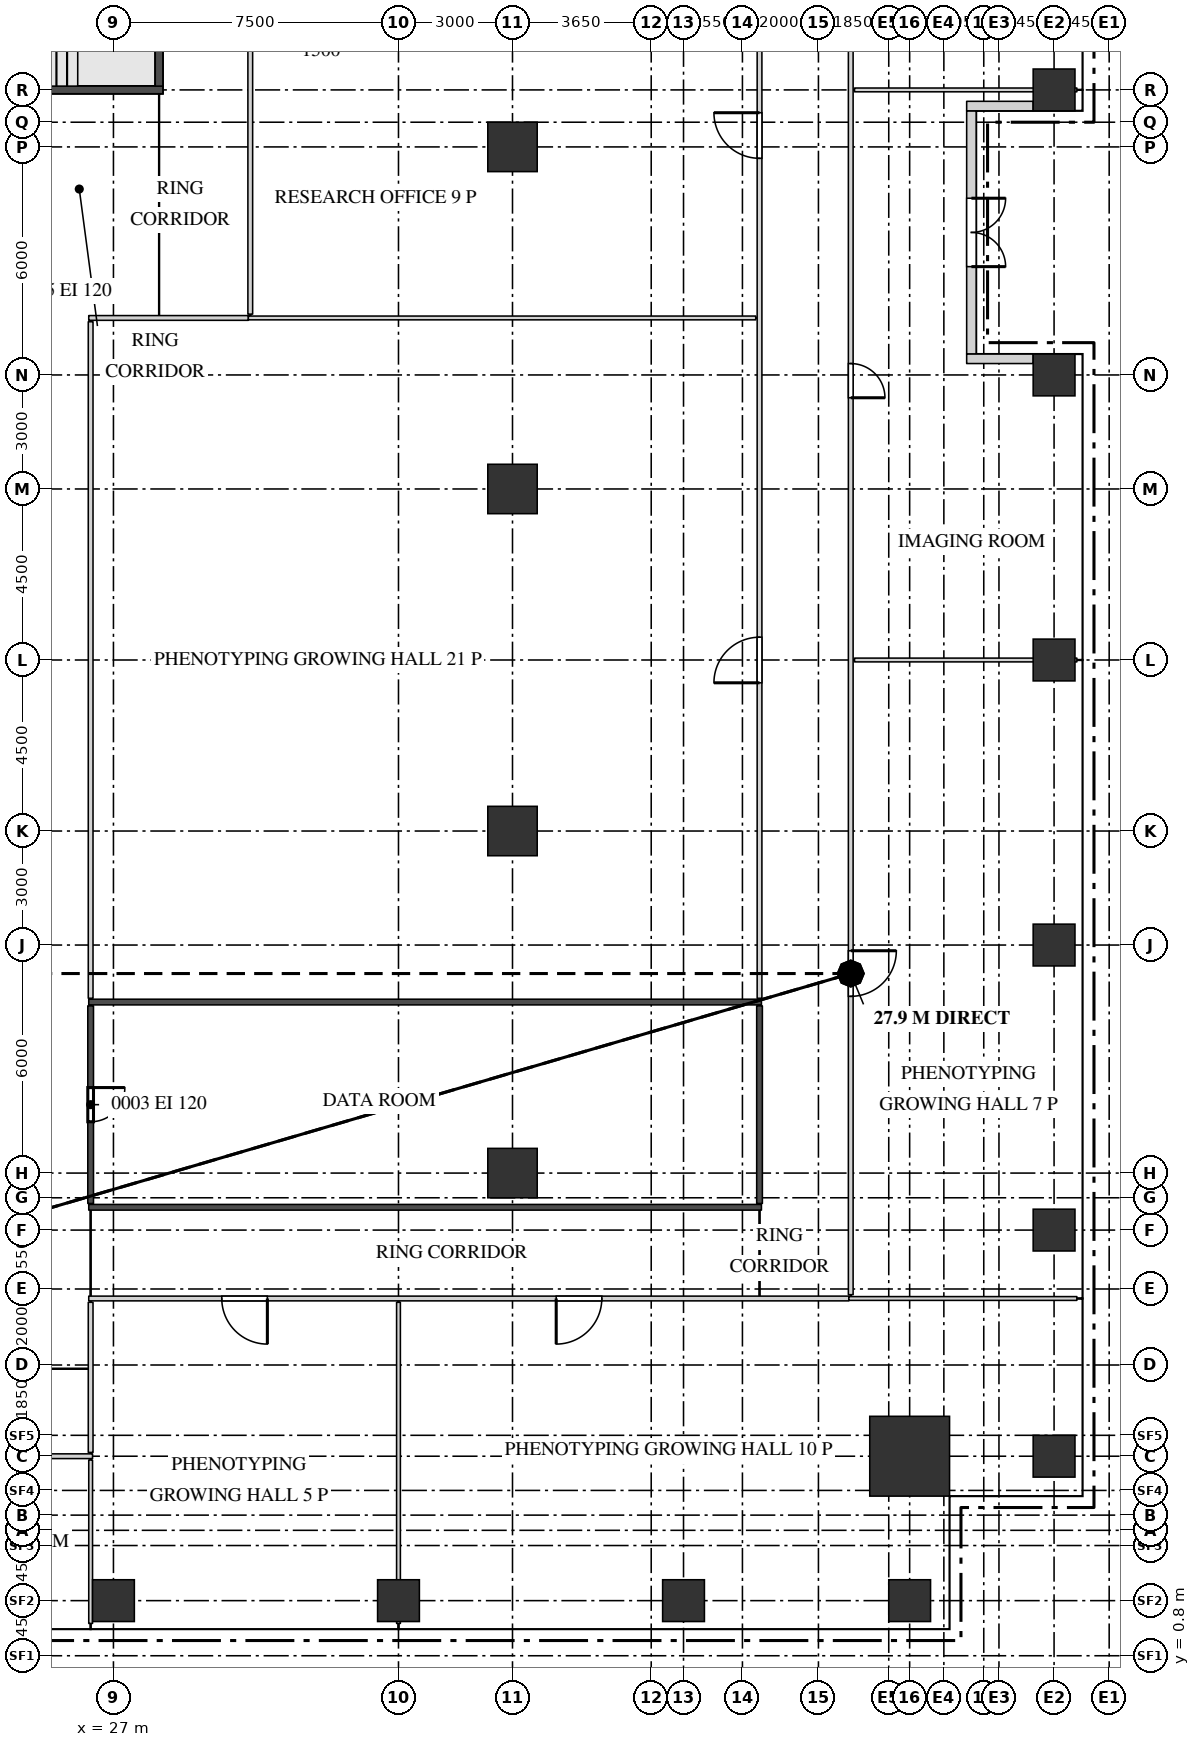
"""IFC4 building model, lengths in metres.
Left out: names, types, materials, properties, quantities, classifications, styles, units other than length and angle.
Written with IfcOpenShell. Run it as: python <this file> out.ifc"""

import sys

from ifc_helpers import new_model, si_unit, direction, frame, frame_2d, origin, origin_2d, place, context, subcontext, project, spatial, rectangle, extrude, source, transform, mapped, element, fill, save


model = new_model("IFC4")
c1 = context("Model", 3, precision=1e-05, world=origin(), true_north=direction((0.0, 1.0)))
c2 = subcontext(c1, "Body", "Model", "MODEL_VIEW")
j1 = project(units=[si_unit("LENGTHUNIT", "METRE"), si_unit("PLANEANGLEUNIT", "RADIAN")], contexts=[c1])
p1 = place(None, origin())
s1 = spatial("IfcSite", under=j1, at=p1, CompositionType="ELEMENT")
p2 = place(p1, origin())
s2 = spatial("IfcBuilding", under=s1, at=p2, CompositionType="ELEMENT")
p3 = place(p2, frame((0.0, 0.0, 127.9)))
s3 = spatial("IfcBuildingStorey", under=s2, at=p3, CompositionType="ELEMENT", Elevation=127.9)
m1 = source(origin(), c2, "Body", "SweptSolid", [
    extrude(rectangle(XDim=7.1, YDim=0.2, at=frame_2d((3.55, 0.0))), origin(), (0.0, 0.0, 1.0), 4.1),
])
p4 = place(p3, frame((21.2, 42.0, 0.0), z_axis=(0.0, 0.0, 1.0), x_axis=(1.0, 0.0, 0.0)))
e1 = element("IfcWall", 1, at=p4, inside=s3, PredefinedType="SHEAR", context=c2, shape_type="MappedRepresentation", body=[
    mapped(m1, transform((0.0, 0.0, 0.0))),
])
m2 = source(origin(), c2, "Body", "SweptSolid", [
    extrude(rectangle(XDim=3.35, YDim=0.2, at=frame_2d((1.675, 0.0))), origin(), (0.0, 0.0, 1.0), 4.1),
])
p5 = place(p3, frame((28.2, 42.1, 0.0), z_axis=(0.0, 0.0, 1.0), x_axis=(0.0, 1.0, 0.0)))
e2 = element("IfcWall", 2, at=p5, inside=s3, PredefinedType="SHEAR", context=c2, shape_type="MappedRepresentation", body=[
    mapped(m2, transform((0.0, 0.0, 0.0))),
])
m3 = source(origin(), c2, "Body", "SweptSolid", [
    extrude(rectangle(XDim=2.1, YDim=2.1, at=origin_2d()), origin(), (0.0, 0.0, 1.0), 4.4),
])
p6 = place(p3, frame((47.95, 6.05, 0.0), z_axis=(0.0, 0.0, 1.0), x_axis=(1.0, 0.0, 0.0)))
e3 = element("IfcColumn", 3, at=p6, inside=s3, PredefinedType="COLUMN", context=c2, shape_type="MappedRepresentation", body=[
    mapped(m3, transform((0.0, 0.0, 0.0))),
])
m4 = source(origin(), c2, "Body", "SweptSolid", [
    extrude(rectangle(XDim=1.1, YDim=1.1, at=origin_2d()), origin(), (0.0, 0.0, 1.0), 4.1),
])
for number, where, z_axis, x_axis in (
    (4, (27.0, 2.25, 0.0), (0.0, 0.0, 1.0), (1.0, 0.0, 0.0)),
    (5, (34.5, 2.25, 0.0), (0.0, 0.0, 1.0), (1.0, 0.0, 0.0)),
    (6, (42.0, 2.25, 0.0), (0.0, 0.0, 1.0), (1.0, 0.0, 0.0)),
    (7, (47.95, 2.25, 0.0), (0.0, 0.0, 1.0), (1.0, 0.0, 0.0)),
    (8, (51.75, 6.05, 0.0), (0.0, 0.0, 1.0), (1.0, 0.0, 0.0)),
    (9, (51.75, 12.0, 0.0), (0.0, 0.0, 1.0), (1.0, 0.0, 0.0)),
    (10, (51.75, 19.5, 0.0), (0.0, 0.0, 1.0), (1.0, 0.0, 0.0)),
    (11, (51.75, 27.0, 0.0), (0.0, 0.0, 1.0), (1.0, 0.0, 0.0)),
    (12, (51.75, 34.5, 0.0), (0.0, 0.0, 1.0), (1.0, 0.0, 0.0)),
    (13, (51.75, 42.0, 0.0), (0.0, 0.0, 1.0), (1.0, 0.0, 0.0)),
):
    element("IfcColumn", number, at=place(p3, frame(where, z_axis=z_axis, x_axis=x_axis)), inside=s3, PredefinedType="COLUMN", context=c2, shape_type="MappedRepresentation", body=[
        mapped(m4, transform((0.0, 0.0, 0.0))),
    ])
m5 = source(origin(), c2, "Body", "SweptSolid", [
    extrude(rectangle(XDim=1.3, YDim=1.3, at=origin_2d()), origin(), (0.0, 0.0, 1.0), 4.1),
])
for number, where, z_axis, x_axis in (
    (14, (37.5, 13.5, 0.0), (0.0, 0.0, 1.0), (1.0, 0.0, 0.0)),
    (15, (37.5, 22.5, 0.0), (0.0, 0.0, 1.0), (1.0, 0.0, 0.0)),
    (16, (37.5, 31.5, 0.0), (0.0, 0.0, 1.0), (1.0, 0.0, 0.0)),
    (17, (37.5, 40.5, 0.0), (0.0, 0.0, 1.0), (1.0, 0.0, 0.0)),
):
    element("IfcColumn", number, at=place(p3, frame(where, z_axis=z_axis, x_axis=x_axis)), inside=s3, PredefinedType="COLUMN", context=c2, shape_type="MappedRepresentation", body=[
        mapped(m5, transform((0.0, 0.0, 0.0))),
    ])
m6 = source(origin(), c2, "Body", "SweptSolid", [
    extrude(rectangle(XDim=6.4, YDim=0.25, at=frame_2d((3.2, 0.0))), origin(), (0.0, 0.0, 1.0), 3.55),
])
p7 = place(p3, frame((49.575, 35.05, 0.0), z_axis=(0.0, 0.0, 1.0), x_axis=(0.0, 1.0, 0.0)))
e18 = element("IfcWall", 18, at=p7, inside=s3, PredefinedType="SOLIDWALL", context=c2, shape_type="MappedRepresentation", body=[
    mapped(m6, transform((0.0, 0.0, 0.0))),
])
m7 = source(origin(), c2, "Body", "SweptSolid", [
    extrude(rectangle(XDim=1.65, YDim=2.4, at=frame_2d((0.825, 1.2))), frame((0.0, 0.135, 0.0), z_axis=(0.0, -1.0, 0.0), x_axis=(1.0, 0.0, 0.0)), (0.0, 0.0, 1.0), 0.27),
])
p8 = place(p7, frame((0.35, 0.0, 0.0)))
e19 = element("IfcOpeningElement", 19, at=p8, cuts=e18, PredefinedType="OPENING", context=c2, shape_type="MappedRepresentation", body=[
    mapped(m7, transform((0.0, 0.0, 0.0))),
])
p9 = place(p7, frame((4.4, 0.0, 0.0)))
e20 = element("IfcOpeningElement", 20, at=p9, cuts=e18, PredefinedType="OPENING", context=c2, shape_type="MappedRepresentation", body=[
    mapped(m7, transform((0.0, 0.0, 0.0))),
])
m8 = source(origin(), c2, "Body", "SweptSolid", [
    extrude(rectangle(XDim=1.8, YDim=2.4, at=frame_2d((0.9, 1.2))), frame((0.0, 0.135, 0.0), z_axis=(0.0, -1.0, 0.0), x_axis=(1.0, 0.0, 0.0)), (0.0, 0.0, 1.0), 0.27),
])
p10 = place(p7, frame((2.3, 0.0, 0.0)))
e21 = element("IfcOpeningElement", 21, at=p10, cuts=e18, PredefinedType="OPENING", context=c2, shape_type="MappedRepresentation", body=[
    mapped(m8, transform((0.0, 0.0, 0.0))),
])
m9 = source(origin(), c2, "Body", "SweptSolid", [
    extrude(rectangle(XDim=1.75, YDim=0.25, at=frame_2d((0.875, 0.0))), origin(), (0.0, 0.0, 1.0), 3.55),
])
for number, where, z_axis, x_axis in (
    (22, (51.2, 34.925, 0.0), (0.0, 0.0, 1.0), (-1.0, 0.0, 0.0)),
    (23, (51.2, 41.575, 0.0), (0.0, 0.0, 1.0), (-1.0, 0.0, 0.0)),
):
    element("IfcWall", number, at=place(p3, frame(where, z_axis=z_axis, x_axis=x_axis)), inside=s3, PredefinedType="SOLIDWALL", context=c2, shape_type="MappedRepresentation", body=[
        mapped(m9, transform((0.0, 0.0, 0.0))),
    ])
m10 = source(origin(), c2, "Body", "SweptSolid", [
    extrude(rectangle(XDim=4.3, YDim=0.1, at=frame_2d((2.15, 0.0))), origin(), (0.0, 0.0, 1.0), 4.2),
])
p11 = place(p3, frame((26.4, 1.65, 0.0), z_axis=(0.0, 0.0, 1.0), x_axis=(0.0, 1.0, 0.0)))
e24 = element("IfcWall", 24, at=p11, inside=s3, PredefinedType="PARTITIONING", context=c2, shape_type="MappedRepresentation", body=[
    mapped(m10, transform((0.0, 0.0, 0.0))),
])
m11 = source(origin(), c2, "Body", "SweptSolid", [
    extrude(rectangle(XDim=8.45, YDim=0.1, at=frame_2d((4.225, 0.0))), origin(), (0.0, 0.0, 1.0), 3.6),
])
p12 = place(p3, frame((34.5, 1.65, 0.0), z_axis=(0.0, 0.0, 1.0), x_axis=(0.0, 1.0, 0.0)))
e25 = element("IfcWall", 25, at=p12, inside=s3, PredefinedType="PARTITIONING", context=c2, shape_type="MappedRepresentation", body=[
    mapped(m11, transform((0.0, 0.0, 0.0))),
])
m12 = source(origin(), c2, "Body", "SweptSolid", [
    extrude(rectangle(XDim=22.3, YDim=0.125, at=frame_2d((11.15, 0.0))), origin(), (0.0, 0.0, 1.0), 3.55),
])
p13 = place(p3, frame((4.15, 6.05, 0.0), z_axis=(0.0, 0.0, 1.0), x_axis=(1.0, 0.0, 0.0)))
e26 = element("IfcWall", 26, at=p13, inside=s3, PredefinedType="PARTITIONING", context=c2, shape_type="MappedRepresentation", body=[
    mapped(m12, transform((0.0, 0.0, 0.0))),
])
m13 = source(origin(), c2, "Body", "SweptSolid", [
    extrude(rectangle(XDim=0.9, YDim=2.1, at=frame_2d((0.45, 1.05))), frame((0.0, 0.073, 0.0), z_axis=(0.0, -1.0, 0.0), x_axis=(1.0, 0.0, 0.0)), (0.0, 0.0, 1.0), 0.145),
])
p14 = place(p13, frame((10.7, 0.0, 0.0)))
e27 = element("IfcOpeningElement", 27, at=p14, cuts=e26, PredefinedType="OPENING", context=c2, shape_type="MappedRepresentation", body=[
    mapped(m13, transform((0.0, 0.0, 0.0))),
])
m14 = source(origin(), c2, "Body", "SweptSolid", [
    extrude(rectangle(XDim=3.95, YDim=0.125, at=frame_2d((1.975, 0.0))), origin(), (0.0, 0.0, 1.0), 4.2),
])
p15 = place(p3, frame((26.4, 6.15, 0.0), z_axis=(0.0, 0.0, 1.0), x_axis=(0.0, 1.0, 0.0)))
e28 = element("IfcWall", 28, at=p15, inside=s3, PredefinedType="PARTITIONING", context=c2, shape_type="MappedRepresentation", body=[
    mapped(m14, transform((0.0, 0.0, 0.0))),
])
m15 = source(origin(), c2, "Body", "SweptSolid", [
    extrude(rectangle(XDim=20.0, YDim=0.125, at=frame_2d((10.0, 0.0))), origin(), (0.0, 0.0, 1.0), 4.2),
])
p16 = place(p3, frame((26.35, 10.2, 0.0), z_axis=(0.0, 0.0, 1.0), x_axis=(1.0, 0.0, 0.0)))
e29 = element("IfcWall", 29, at=p16, inside=s3, PredefinedType="PARTITIONING", context=c2, shape_type="MappedRepresentation", body=[
    mapped(m15, transform((0.0, 0.0, 0.0))),
])
m16 = source(origin(), c2, "Body", "SweptSolid", [
    extrude(rectangle(XDim=1.2, YDim=2.1, at=frame_2d((0.6, 1.05))), frame((0.0, 0.073, 0.0), z_axis=(0.0, -1.0, 0.0), x_axis=(1.0, 0.0, 0.0)), (0.0, 0.0, 1.0), 0.145),
])
p17 = place(p16, frame((3.5, 0.0, 0.0)))
e30 = element("IfcOpeningElement", 30, at=p17, cuts=e29, PredefinedType="OPENING", context=c2, shape_type="MappedRepresentation", body=[
    mapped(m16, transform((0.0, 0.0, 0.0))),
])
p18 = place(p16, frame((12.3, 0.0, 0.0)))
e31 = element("IfcOpeningElement", 31, at=p18, cuts=e29, PredefinedType="OPENING", context=c2, shape_type="MappedRepresentation", body=[
    mapped(m16, transform((0.0, 0.0, 0.0))),
])
m17 = source(origin(), c2, "Body", "SweptSolid", [
    extrude(rectangle(XDim=6.0, YDim=0.1, at=frame_2d((3.0, 0.0))), origin(), (0.0, 0.0, 1.0), 4.2),
])
p19 = place(p3, frame((46.35, 10.2, 0.0), z_axis=(0.0, 0.0, 1.0), x_axis=(1.0, 0.0, 0.0)))
e32 = element("IfcWall", 32, at=p19, inside=s3, PredefinedType="PARTITIONING", context=c2, shape_type="MappedRepresentation", body=[
    mapped(m17, transform((0.0, 0.0, 0.0))),
])
m18 = source(origin(), c2, "Body", "SweptSolid", [
    extrude(rectangle(XDim=37.65, YDim=0.125, at=frame_2d((18.825, 0.0))), origin(), (0.0, 0.0, 1.0), 4.2),
])
p20 = place(p3, frame((46.4, 10.3, 0.0), z_axis=(0.0, 0.0, 1.0), x_axis=(0.0, 1.0, 0.0)))
e33 = element("IfcWall", 33, at=p20, inside=s3, PredefinedType="PARTITIONING", context=c2, shape_type="MappedRepresentation", body=[
    mapped(m18, transform((0.0, 0.0, 0.0))),
])
p21 = place(p20, frame((7.85, 0.0, 0.0)))
e34 = element("IfcOpeningElement", 34, at=p21, cuts=e33, PredefinedType="OPENING", context=c2, shape_type="MappedRepresentation", body=[
    mapped(m16, transform((0.0, 0.0, 0.0))),
])
p22 = place(p20, frame((23.6, 0.0, 0.0)))
e35 = element("IfcOpeningElement", 35, at=p22, cuts=e33, PredefinedType="OPENING", context=c2, shape_type="MappedRepresentation", body=[
    mapped(m13, transform((0.0, 0.0, 0.0))),
])
p23 = place(p20, frame((33.2, 0.0, 0.0)))
e36 = element("IfcOpeningElement", 36, at=p23, cuts=e33, PredefinedType="OPENING", context=c2, shape_type="MappedRepresentation", body=[
    mapped(m13, transform((0.0, 0.0, 0.0))),
])
m19 = source(origin(), c2, "Body", "SweptSolid", [
    extrude(rectangle(XDim=17.7, YDim=0.15, at=frame_2d((8.85, 0.0))), origin(), (0.0, 0.0, 1.0), 4.2),
])
p24 = place(p3, frame((26.35, 12.6, 0.0), z_axis=(0.0, 0.0, 1.0), x_axis=(1.0, 0.0, 0.0)))
e37 = element("IfcWall", 37, at=p24, inside=s3, PredefinedType="PARTITIONING", context=c2, shape_type="MappedRepresentation", body=[
    mapped(m19, transform((0.0, 0.0, 0.0))),
])
m20 = source(origin(), c2, "Body", "SweptSolid", [
    extrude(rectangle(XDim=5.2, YDim=0.15, at=frame_2d((2.6, 0.0))), origin(), (0.0, 0.0, 1.0), 4.2),
])
p25 = place(p3, frame((26.4, 12.7, 0.0), z_axis=(0.0, 0.0, 1.0), x_axis=(0.0, 1.0, 0.0)))
e38 = element("IfcWall", 38, at=p25, inside=s3, PredefinedType="PARTITIONING", context=c2, shape_type="MappedRepresentation", body=[
    mapped(m20, transform((0.0, 0.0, 0.0))),
])
m21 = source(origin(), c2, "Body", "SweptSolid", [
    extrude(rectangle(XDim=0.9, YDim=2.1, at=frame_2d((0.45, 1.05))), frame((0.0, 0.085, 0.0), z_axis=(0.0, -1.0, 0.0), x_axis=(1.0, 0.0, 0.0)), (0.0, 0.0, 1.0), 0.17),
])
p26 = place(p25, frame((2.15, 0.0, 0.0)))
e39 = element("IfcOpeningElement", 39, at=p26, cuts=e38, PredefinedType="OPENING", context=c2, shape_type="MappedRepresentation", body=[
    mapped(m21, transform((0.0, 0.0, 0.0))),
])
p27 = place(p3, frame((44.0, 12.7, 0.0), z_axis=(0.0, 0.0, 1.0), x_axis=(0.0, 1.0, 0.0)))
e40 = element("IfcWall", 40, at=p27, inside=s3, PredefinedType="PARTITIONING", context=c2, shape_type="MappedRepresentation", body=[
    mapped(m20, transform((0.0, 0.0, 0.0))),
])
p28 = place(p3, frame((26.35, 18.0, 0.0), z_axis=(0.0, 0.0, 1.0), x_axis=(1.0, 0.0, 0.0)))
e41 = element("IfcWall", 41, at=p28, inside=s3, PredefinedType="PARTITIONING", context=c2, shape_type="MappedRepresentation", body=[
    mapped(m19, transform((0.0, 0.0, 0.0))),
])
m22 = source(origin(), c2, "Body", "SweptSolid", [
    extrude(rectangle(XDim=17.8, YDim=0.125, at=frame_2d((8.9, 0.0))), origin(), (0.0, 0.0, 1.0), 4.2),
])
p29 = place(p3, frame((26.4, 18.1, 0.0), z_axis=(0.0, 0.0, 1.0), x_axis=(0.0, 1.0, 0.0)))
e42 = element("IfcWall", 42, at=p29, inside=s3, PredefinedType="PARTITIONING", context=c2, shape_type="MappedRepresentation", body=[
    mapped(m22, transform((0.0, 0.0, 0.0))),
])
m23 = source(origin(), c2, "Body", "SweptSolid", [
    extrude(rectangle(XDim=27.45, YDim=0.125, at=frame_2d((13.725, 0.0))), origin(), (0.0, 0.0, 1.0), 4.2),
])
p30 = place(p3, frame((44.0, 18.1, 0.0), z_axis=(0.0, 0.0, 1.0), x_axis=(0.0, 1.0, 0.0)))
e43 = element("IfcWall", 43, at=p30, inside=s3, PredefinedType="PARTITIONING", context=c2, shape_type="MappedRepresentation", body=[
    mapped(m23, transform((0.0, 0.0, 0.0))),
])
p31 = place(p30, frame((8.3, 0.0, 0.0)))
e44 = element("IfcOpeningElement", 44, at=p31, cuts=e43, PredefinedType="OPENING", context=c2, shape_type="MappedRepresentation", body=[
    mapped(m16, transform((0.0, 0.0, 0.0))),
])
p32 = place(p30, frame((22.1, 0.0, 0.0)))
e45 = element("IfcOpeningElement", 45, at=p32, cuts=e43, PredefinedType="OPENING", context=c2, shape_type="MappedRepresentation", body=[
    mapped(m16, transform((0.0, 0.0, 0.0))),
])
m24 = source(origin(), c2, "Body", "SweptSolid", [
    extrude(rectangle(XDim=5.85, YDim=0.1, at=frame_2d((2.925, 0.0))), origin(), (0.0, 0.0, 1.0), 4.2),
])
p33 = place(p3, frame((46.5, 27.0, 0.0), z_axis=(0.0, 0.0, 1.0), x_axis=(1.0, 0.0, 0.0)))
e46 = element("IfcWall", 46, at=p33, inside=s3, PredefinedType="PARTITIONING", context=c2, shape_type="MappedRepresentation", body=[
    mapped(m24, transform((0.0, 0.0, 0.0))),
])
m25 = source(origin(), c2, "Body", "SweptSolid", [
    extrude(rectangle(XDim=4.2, YDim=0.125, at=frame_2d((2.1, 0.0))), origin(), (0.0, 0.0, 1.0), 4.2),
])
p34 = place(p3, frame((26.35, 36.0, 0.0), z_axis=(0.0, 0.0, 1.0), x_axis=(1.0, 0.0, 0.0)))
e47 = element("IfcWall", 47, at=p34, inside=s3, PredefinedType="PARTITIONING", context=c2, shape_type="MappedRepresentation", body=[
    mapped(m25, transform((0.0, 0.0, 0.0))),
])
m26 = source(origin(), c2, "Body", "SweptSolid", [
    extrude(rectangle(XDim=13.35, YDim=0.1, at=frame_2d((6.675, 0.0))), origin(), (0.0, 0.0, 1.0), 4.2),
])
p35 = place(p3, frame((30.55, 36.0, 0.0), z_axis=(0.0, 0.0, 1.0), x_axis=(1.0, 0.0, 0.0)))
e48 = element("IfcWall", 48, at=p35, inside=s3, PredefinedType="PARTITIONING", context=c2, shape_type="MappedRepresentation", body=[
    mapped(m26, transform((0.0, 0.0, 0.0))),
])
m27 = source(origin(), c2, "Body", "SweptSolid", [
    extrude(rectangle(XDim=9.45, YDim=0.125, at=frame_2d((4.725, 0.0))), origin(), (0.0, 0.0, 1.0), 4.2),
])
p36 = place(p3, frame((30.6, 36.1, 0.0), z_axis=(0.0, 0.0, 1.0), x_axis=(0.0, 1.0, 0.0)))
e49 = element("IfcWall", 49, at=p36, inside=s3, PredefinedType="PARTITIONING", context=c2, shape_type="MappedRepresentation", body=[
    mapped(m27, transform((0.0, 0.0, 0.0))),
])
p37 = place(p3, frame((46.5, 42.0, 0.0), z_axis=(0.0, 0.0, 1.0), x_axis=(1.0, 0.0, 0.0)))
e50 = element("IfcWall", 50, at=p37, inside=s3, PredefinedType="PARTITIONING", context=c2, shape_type="MappedRepresentation", body=[
    mapped(m24, transform((0.0, 0.0, 0.0))),
])
m28 = source(origin(), c2, "Body", "SweptSolid", [
    extrude(rectangle(XDim=1.65, YDim=2.4, at=frame_2d((0.825, 1.2))), frame((0.0, 0.03, 0.0), z_axis=(0.0, -1.0, 0.0), x_axis=(1.0, 0.0, 0.0)), (0.0, 0.0, 1.0), 0.06),
])
p38 = place(p8, origin())
e51 = element("IfcWindow", 51, at=p38, inside=s3, PartitioningType="SINGLE_PANEL", PredefinedType="WINDOW", context=c2, shape_type="MappedRepresentation", body=[
    mapped(m28, transform((0.0, 0.0, 0.0))),
])
fill(e19, e51)
p39 = place(p9, origin())
e52 = element("IfcWindow", 52, at=p39, inside=s3, PartitioningType="SINGLE_PANEL", PredefinedType="WINDOW", context=c2, shape_type="MappedRepresentation", body=[
    mapped(m28, transform((0.0, 0.0, 0.0))),
])
fill(e20, e52)
m29 = source(origin(), c2, "Body", "SweptSolid", [
    extrude(rectangle(XDim=1.8, YDim=2.4, at=frame_2d((0.9, 1.2))), frame((0.0, 0.025, 0.0), z_axis=(0.0, -1.0, 0.0), x_axis=(1.0, 0.0, 0.0)), (0.0, 0.0, 1.0), 0.05),
])
p40 = place(p10, origin())
e53 = element("IfcDoor", 53, at=p40, inside=s3, OperationType="DOUBLE_DOOR_DOUBLE_SWING", PredefinedType="DOOR", context=c2, shape_type="MappedRepresentation", body=[
    mapped(m29, transform((0.0, 0.0, 0.0))),
])
fill(e21, e53)
m30 = source(origin(), c2, "Body", "SweptSolid", [
    extrude(rectangle(XDim=1.2, YDim=2.1, at=frame_2d((0.6, 1.05))), frame((0.0, 0.025, 0.0), z_axis=(0.0, -1.0, 0.0), x_axis=(1.0, 0.0, 0.0)), (0.0, 0.0, 1.0), 0.05),
])
p41 = place(p17, origin())
e54 = element("IfcDoor", 54, at=p41, inside=s3, OperationType="SINGLE_SWING_RIGHT", PredefinedType="DOOR", context=c2, shape_type="MappedRepresentation", body=[
    mapped(m30, transform((0.0, 0.0, 0.0))),
])
fill(e30, e54)
p42 = place(p18, origin())
e55 = element("IfcDoor", 55, at=p42, inside=s3, OperationType="SINGLE_SWING_LEFT", PredefinedType="DOOR", context=c2, shape_type="MappedRepresentation", body=[
    mapped(m30, transform((0.0, 0.0, 0.0))),
])
fill(e31, e55)
m31 = source(origin(), c2, "Body", "SweptSolid", [
    extrude(rectangle(XDim=0.9, YDim=2.1, at=frame_2d((0.45, 1.05))), frame((0.0, 0.025, 0.0), z_axis=(0.0, -1.0, 0.0), x_axis=(1.0, 0.0, 0.0)), (0.0, 0.0, 1.0), 0.05),
])
p43 = place(p26, origin())
e56 = element("IfcDoor", 56, at=p43, inside=s3, OperationType="SINGLE_SWING_RIGHT", PredefinedType="DOOR", context=c2, shape_type="MappedRepresentation", body=[
    mapped(m31, transform((0.0, 0.0, 0.0))),
])
fill(e39, e56)
p44 = place(p31, origin())
e57 = element("IfcDoor", 57, at=p44, inside=s3, OperationType="SINGLE_SWING_RIGHT", PredefinedType="DOOR", context=c2, shape_type="MappedRepresentation", body=[
    mapped(m30, transform((0.0, 0.0, 0.0))),
])
fill(e44, e57)
p45 = place(p32, origin())
e58 = element("IfcDoor", 58, at=p45, inside=s3, OperationType="SINGLE_SWING_LEFT", PredefinedType="DOOR", context=c2, shape_type="MappedRepresentation", body=[
    mapped(m30, transform((0.0, 0.0, 0.0))),
])
fill(e45, e58)
p46 = place(p21, origin())
e59 = element("IfcDoor", 59, at=p46, inside=s3, OperationType="SINGLE_SWING_RIGHT", PredefinedType="DOOR", context=c2, shape_type="MappedRepresentation", body=[
    mapped(m30, transform((0.0, 0.0, 0.0))),
])
fill(e34, e59)
p47 = place(p22, origin())
e60 = element("IfcDoor", 60, at=p47, inside=s3, OperationType="SINGLE_SWING_LEFT", PredefinedType="DOOR", context=c2, shape_type="MappedRepresentation", body=[
    mapped(m31, transform((0.0, 0.0, 0.0))),
])
fill(e35, e60)
save(model, sys.argv[1])
